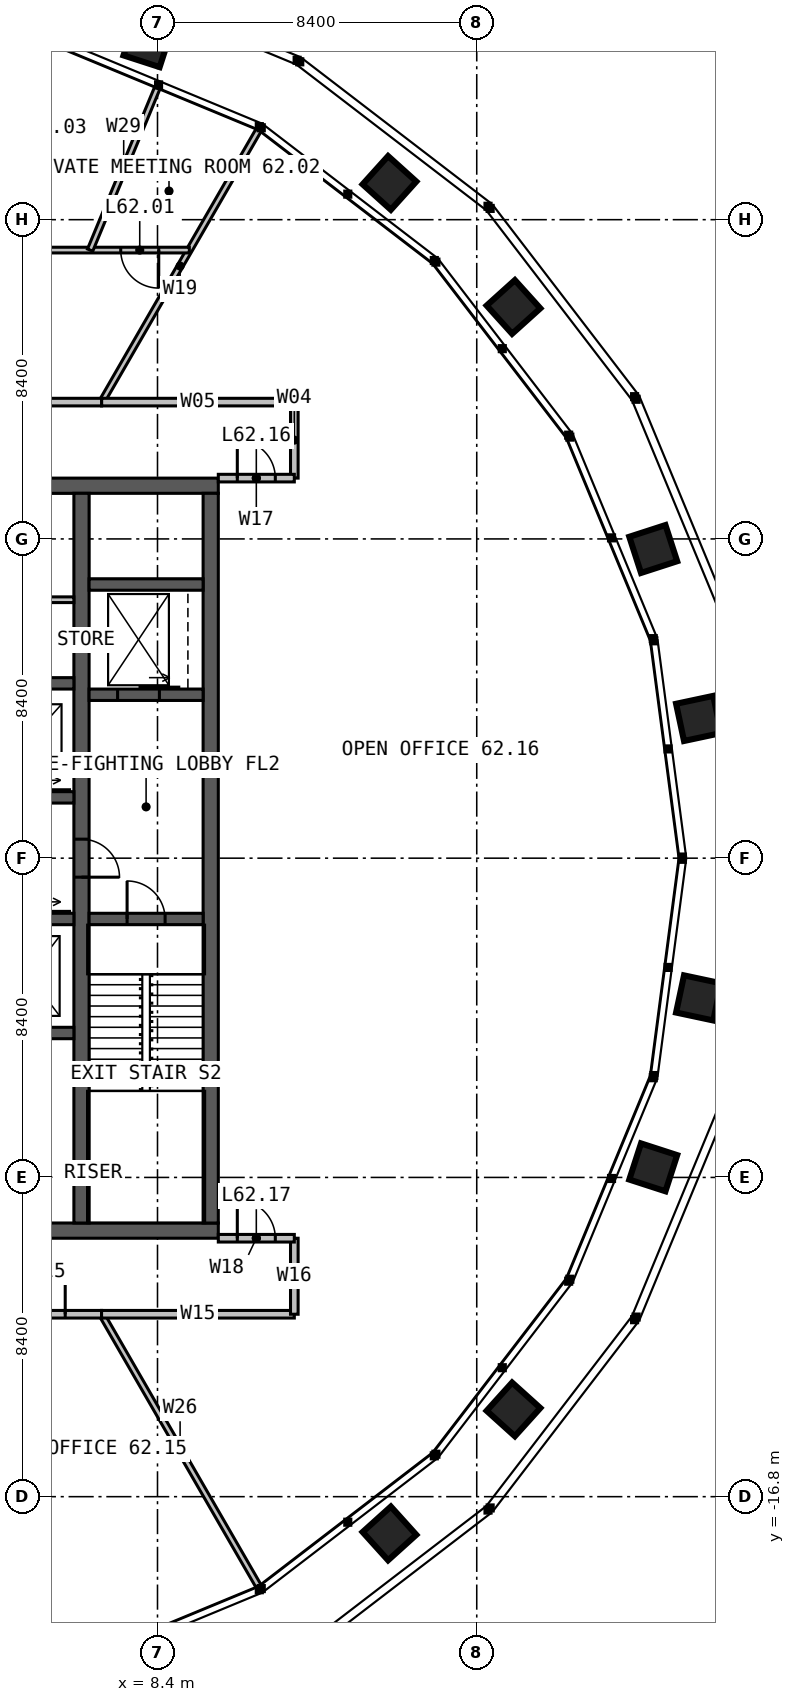
"""IFC4 building model, lengths in metres.
Left out: names, types, materials, properties, quantities, classifications, styles, units other than length and angle.
Written with IfcOpenShell. Run it as: python <this file> out.ifc"""

import sys

from ifc_helpers import new_model, si_unit, direction, frame, frame_2d, origin, place, context, subcontext, project, spatial, rectangle, extrude, element, fill, save


model = new_model("IFC4")
c1 = context("Model", 3, precision=1e-05, world=origin(), true_north=direction((0.0, 1.0)))
c2 = subcontext(c1, "Body", "Model", "MODEL_VIEW")
j1 = project(units=[si_unit("LENGTHUNIT", "METRE"), si_unit("PLANEANGLEUNIT", "RADIAN")], contexts=[c1])
p1 = place(None, origin())
s1 = spatial("IfcSite", under=j1, at=p1, CompositionType="ELEMENT")
p2 = place(p1, origin())
s2 = spatial("IfcBuilding", under=s1, at=p2, CompositionType="ELEMENT")
p3 = place(p2, frame((0.0, 0.0, 256.0)))
s3 = spatial("IfcBuildingStorey", under=s2, at=p3, CompositionType="ELEMENT", Elevation=256.0)
p4 = place(p3, frame((-10.0, 9.8, 0.0), z_axis=(0.0, 0.0, 1.0), x_axis=(1.0, 0.0, 0.0)))
e1 = element("IfcWall", 1, at=p4, inside=s3, PredefinedType="SOLIDWALL", context=c2, shape_type="SweptSolid", body=[
    extrude(rectangle(XDim=20.0, YDim=0.4, at=frame_2d((10.0, 0.0))), origin(), (0.0, 0.0, 1.0), 4.0),
])
p5 = place(p4, frame((9.4, 0.0, 0.0)))
e2 = element("IfcOpeningElement", 2, at=p5, cuts=e1, PredefinedType="OPENING", context=c2, shape_type="SweptSolid", body=[
    extrude(rectangle(XDim=1.2, YDim=2.2, at=frame_2d((0.6, 1.1))), frame((0.0, 0.21, 0.0), z_axis=(0.0, -1.0, 0.0), x_axis=(1.0, 0.0, 0.0)), (0.0, 0.0, 1.0), 0.42),
])
p6 = place(p3, frame((10.0, -9.8, 0.0), z_axis=(0.0, 0.0, 1.0), x_axis=(-1.0, 0.0, 0.0)))
e3 = element("IfcWall", 3, at=p6, inside=s3, PredefinedType="SOLIDWALL", context=c2, shape_type="SweptSolid", body=[
    extrude(rectangle(XDim=20.0, YDim=0.4, at=frame_2d((10.0, 0.0))), origin(), (0.0, 0.0, 1.0), 4.0),
])
p7 = place(p6, frame((6.875, 0.0, 0.0)))
e4 = element("IfcOpeningElement", 4, at=p7, cuts=e3, PredefinedType="OPENING", context=c2, shape_type="SweptSolid", body=[
    extrude(rectangle(XDim=1.2, YDim=2.2, at=frame_2d((0.6, 1.1))), frame((0.0, 0.21, 0.0), z_axis=(0.0, -1.0, 0.0), x_axis=(1.0, 0.0, 0.0)), (0.0, 0.0, 1.0), 0.42),
])
p8 = place(p3, frame((9.8, -9.6, 0.0), z_axis=(0.0, 0.0, 1.0), x_axis=(0.0, 1.0, 0.0)))
e5 = element("IfcWall", 5, at=p8, inside=s3, PredefinedType="SOLIDWALL", context=c2, shape_type="SweptSolid", body=[
    extrude(rectangle(XDim=19.2, YDim=0.4, at=frame_2d((9.6, 0.0))), origin(), (0.0, 0.0, 1.0), 4.0),
])
p9 = place(p3, frame((6.4, 9.6, 0.0), z_axis=(0.0, 0.0, 1.0), x_axis=(0.0, -1.0, 0.0)))
e6 = element("IfcWall", 6, at=p9, inside=s3, PredefinedType="SOLIDWALL", context=c2, shape_type="SweptSolid", body=[
    extrude(rectangle(XDim=19.2, YDim=0.4, at=frame_2d((9.6, 0.0))), origin(), (0.0, 0.0, 1.0), 4.0),
])
p10 = place(p9, frame((9.1, 0.0, 0.0)))
e7 = element("IfcOpeningElement", 7, at=p10, cuts=e6, PredefinedType="OPENING", context=c2, shape_type="SweptSolid", body=[
    extrude(rectangle(XDim=1.0, YDim=2.2, at=frame_2d((0.5, 1.1))), frame((0.0, 0.21, 0.0), z_axis=(0.0, -1.0, 0.0), x_axis=(1.0, 0.0, 0.0)), (0.0, 0.0, 1.0), 0.42),
])
p11 = place(p3, frame((1.35, 1.6, 0.0), z_axis=(0.0, 0.0, 1.0), x_axis=(1.0, 0.0, 0.0)))
e8 = element("IfcWall", 8, at=p11, inside=s3, PredefinedType="SOLIDWALL", context=c2, shape_type="SweptSolid", body=[
    extrude(rectangle(XDim=4.85, YDim=0.3, at=frame_2d((2.425, 0.0))), origin(), (0.0, 0.0, 1.0), 4.0),
])
p12 = place(p11, frame((0.6, 0.0, 0.0)))
e9 = element("IfcOpeningElement", 9, at=p12, cuts=e8, PredefinedType="OPENING", context=c2, shape_type="SweptSolid", body=[
    extrude(rectangle(XDim=1.1, YDim=2.2, at=frame_2d((0.55, 1.1))), frame((0.0, 0.16, 0.0), z_axis=(0.0, -1.0, 0.0), x_axis=(1.0, 0.0, 0.0)), (0.0, 0.0, 1.0), 0.32),
])
p13 = place(p11, frame((3.125, 0.0, 0.0)))
e10 = element("IfcOpeningElement", 10, at=p13, cuts=e8, PredefinedType="OPENING", context=c2, shape_type="SweptSolid", body=[
    extrude(rectangle(XDim=1.1, YDim=2.2, at=frame_2d((0.55, 1.1))), frame((0.0, 0.16, 0.0), z_axis=(0.0, -1.0, 0.0), x_axis=(1.0, 0.0, 0.0)), (0.0, 0.0, 1.0), 0.32),
])
p14 = place(p3, frame((1.35, 4.6, 0.0), z_axis=(0.0, 0.0, 1.0), x_axis=(1.0, 0.0, 0.0)))
e11 = element("IfcWall", 11, at=p14, inside=s3, PredefinedType="SOLIDWALL", context=c2, shape_type="SweptSolid", body=[
    extrude(rectangle(XDim=4.85, YDim=0.3, at=frame_2d((2.425, 0.0))), origin(), (0.0, 0.0, 1.0), 4.0),
])
p15 = place(p3, frame((3.85, -1.6, 0.0), z_axis=(0.0, 0.0, 1.0), x_axis=(1.0, 0.0, 0.0)))
e12 = element("IfcWall", 12, at=p15, inside=s3, PredefinedType="SOLIDWALL", context=c2, shape_type="SweptSolid", body=[
    extrude(rectangle(XDim=2.35, YDim=0.3, at=frame_2d((1.175, 0.0))), origin(), (0.0, 0.0, 1.0), 4.0),
])
p16 = place(p15, frame((0.625, 0.0, 0.0)))
e13 = element("IfcOpeningElement", 13, at=p16, cuts=e12, PredefinedType="OPENING", context=c2, shape_type="SweptSolid", body=[
    extrude(rectangle(XDim=1.1, YDim=2.2, at=frame_2d((0.55, 1.1))), frame((0.0, 0.16, 0.0), z_axis=(0.0, -1.0, 0.0), x_axis=(1.0, 0.0, 0.0)), (0.0, 0.0, 1.0), 0.32),
])
p17 = place(p3, frame((3.85, -4.6, 0.0), z_axis=(0.0, 0.0, 1.0), x_axis=(1.0, 0.0, 0.0)))
e14 = element("IfcWall", 14, at=p17, inside=s3, PredefinedType="SOLIDWALL", context=c2, shape_type="SweptSolid", body=[
    extrude(rectangle(XDim=2.35, YDim=0.3, at=frame_2d((1.175, 0.0))), origin(), (0.0, 0.0, 1.0), 4.0),
])
p18 = place(p3, frame((6.6, -1.6, 0.0), z_axis=(0.0, 0.0, 1.0), x_axis=(1.0, 0.0, 0.0)))
e15 = element("IfcWall", 15, at=p18, inside=s3, PredefinedType="SOLIDWALL", context=c2, shape_type="SweptSolid", body=[
    extrude(rectangle(XDim=3.0, YDim=0.3, at=frame_2d((1.5, 0.0))), origin(), (0.0, 0.0, 1.0), 4.0),
])
p19 = place(p18, frame((1.0, 0.0, 0.0)))
e16 = element("IfcOpeningElement", 16, at=p19, cuts=e15, PredefinedType="OPENING", context=c2, shape_type="SweptSolid", body=[
    extrude(rectangle(XDim=1.0, YDim=2.2, at=frame_2d((0.5, 1.1))), frame((0.0, 0.16, 0.0), z_axis=(0.0, -1.0, 0.0), x_axis=(1.0, 0.0, 0.0)), (0.0, 0.0, 1.0), 0.32),
])
p20 = place(p3, frame((6.6, 4.3, 0.0), z_axis=(0.0, 0.0, 1.0), x_axis=(1.0, 0.0, 0.0)))
e17 = element("IfcWall", 17, at=p20, inside=s3, PredefinedType="SOLIDWALL", context=c2, shape_type="SweptSolid", body=[
    extrude(rectangle(XDim=3.0, YDim=0.3, at=frame_2d((1.5, 0.0))), origin(), (0.0, 0.0, 1.0), 4.0),
])
p21 = place(p20, frame((0.75, 0.0, 0.0)))
e18 = element("IfcOpeningElement", 18, at=p21, cuts=e17, PredefinedType="OPENING", context=c2, shape_type="SweptSolid", body=[
    extrude(rectangle(XDim=1.1, YDim=2.2, at=frame_2d((0.55, 1.1))), frame((0.0, 0.16, 0.0), z_axis=(0.0, -1.0, 0.0), x_axis=(1.0, 0.0, 0.0)), (0.0, 0.0, 1.0), 0.32),
])
p22 = place(p3, frame((6.6, 7.2, 0.0), z_axis=(0.0, 0.0, 1.0), x_axis=(1.0, 0.0, 0.0)))
e19 = element("IfcWall", 19, at=p22, inside=s3, PredefinedType="SOLIDWALL", context=c2, shape_type="SweptSolid", body=[
    extrude(rectangle(XDim=3.0, YDim=0.3, at=frame_2d((1.5, 0.0))), origin(), (0.0, 0.0, 1.0), 4.0),
])
p23 = place(p3, frame((1.35, 6.8, 0.0), z_axis=(0.0, 0.0, 1.0), x_axis=(1.0, 0.0, 0.0)))
e20 = element("IfcWall", 20, at=p23, inside=s3, PredefinedType="PARTITIONING", context=c2, shape_type="SweptSolid", body=[
    extrude(rectangle(XDim=4.85, YDim=0.15, at=frame_2d((2.425, 0.0))), origin(), (0.0, 0.0, 1.0), 3.75),
])
p24 = place(p23, frame((3.15, 0.0, 0.0)))
e21 = element("IfcOpeningElement", 21, at=p24, cuts=e20, PredefinedType="OPENING", context=c2, shape_type="SweptSolid", body=[
    extrude(rectangle(XDim=0.9, YDim=2.2, at=frame_2d((0.45, 1.1))), frame((0.0, 0.085, 0.0), z_axis=(0.0, -1.0, 0.0), x_axis=(1.0, 0.0, 0.0)), (0.0, 0.0, 1.0), 0.17),
])
p25 = place(p3, frame((6.928, 12.0, 0.0), z_axis=(0.0, 0.0, 1.0), x_axis=(0.499989206474, 0.86603163534, 0.0)))
e22 = element("IfcWall", 22, at=p25, inside=s3, PredefinedType="PARTITIONING", context=c2, shape_type="SweptSolid", body=[
    extrude(rectangle(XDim=8.266, YDim=0.15, at=frame_2d((4.133, 0.0))), origin(), (0.0, 0.0, 1.0), 2.79),
])
p26 = place(p3, frame((3.215, -12.0, 0.0), z_axis=(0.0, 0.0, 1.0), x_axis=(0.258818707819, -0.965925916664, 0.0)))
e23 = element("IfcWall", 23, at=p26, inside=s3, PredefinedType="PARTITIONING", context=c2, shape_type="SweptSolid", body=[
    extrude(rectangle(XDim=9.699, YDim=0.15, at=frame_2d((4.85, 0.0))), origin(), (0.0, 0.0, 1.0), 2.79),
])
p27 = place(p3, frame((6.928, -12.0, 0.0), z_axis=(0.0, 0.0, 1.0), x_axis=(0.499989206474, -0.86603163534, 0.0)))
e24 = element("IfcWall", 24, at=p27, inside=s3, PredefinedType="PARTITIONING", context=c2, shape_type="SweptSolid", body=[
    extrude(rectangle(XDim=8.266, YDim=0.15, at=frame_2d((4.133, 0.0))), origin(), (0.0, 0.0, 1.0), 2.79),
])
p28 = place(p3, frame((12.0, 10.0, 0.0), z_axis=(0.0, 0.0, 1.0), x_axis=(0.0, 1.0, 0.0)))
e25 = element("IfcWall", 25, at=p28, inside=s3, PredefinedType="PARTITIONING", context=c2, shape_type="SweptSolid", body=[
    extrude(rectangle(XDim=2.0, YDim=0.2, at=frame_2d((1.0, 0.0))), origin(), (0.0, 0.0, 1.0), 3.8),
])
p29 = place(p3, frame((12.0, 12.0, 0.0), z_axis=(0.0, 0.0, 1.0), x_axis=(-1.0, 0.0, 0.0)))
e26 = element("IfcWall", 26, at=p29, inside=s3, PredefinedType="PARTITIONING", context=c2, shape_type="SweptSolid", body=[
    extrude(rectangle(XDim=5.072, YDim=0.2, at=frame_2d((2.536, 0.0))), origin(), (0.0, 0.0, 1.0), 3.8),
])
p30 = place(p3, frame((9.238, 16.0, 0.0), z_axis=(0.0, 0.0, 1.0), x_axis=(-1.0, 0.0, 0.0)))
e27 = element("IfcWall", 27, at=p30, inside=s3, PredefinedType="PARTITIONING", context=c2, shape_type="SweptSolid", body=[
    extrude(rectangle(XDim=18.475, YDim=0.15, at=frame_2d((9.238, 0.0))), origin(), (0.0, 0.0, 1.0), 2.79),
])
p31 = place(p30, frame((0.805, 0.0, 0.0)))
e28 = element("IfcOpeningElement", 28, at=p31, cuts=e27, PredefinedType="OPENING", context=c2, shape_type="SweptSolid", body=[
    extrude(rectangle(XDim=1.0, YDim=2.2, at=frame_2d((0.5, 1.1))), frame((0.0, 0.085, 0.0), z_axis=(0.0, -1.0, 0.0), x_axis=(1.0, 0.0, 0.0)), (0.0, 0.0, 1.0), 0.17),
])
p32 = place(p30, frame((6.077, 0.0, 0.0)))
e29 = element("IfcOpeningElement", 29, at=p32, cuts=e27, PredefinedType="OPENING", context=c2, shape_type="SweptSolid", body=[
    extrude(rectangle(XDim=1.8, YDim=2.2, at=frame_2d((0.9, 1.1))), frame((0.0, 0.085, 0.0), z_axis=(0.0, -1.0, 0.0), x_axis=(1.0, 0.0, 0.0)), (0.0, 0.0, 1.0), 0.17),
])
p33 = place(p30, frame((11.934, 0.0, 0.0)))
e30 = element("IfcOpeningElement", 30, at=p33, cuts=e27, PredefinedType="OPENING", context=c2, shape_type="SweptSolid", body=[
    extrude(rectangle(XDim=1.0, YDim=2.2, at=frame_2d((0.5, 1.1))), frame((0.0, 0.085, 0.0), z_axis=(0.0, -1.0, 0.0), x_axis=(1.0, 0.0, 0.0)), (0.0, 0.0, 1.0), 0.17),
])
p34 = place(p30, frame((14.195, 0.0, 0.0)))
e31 = element("IfcOpeningElement", 31, at=p34, cuts=e27, PredefinedType="OPENING", context=c2, shape_type="SweptSolid", body=[
    extrude(rectangle(XDim=1.0, YDim=2.2, at=frame_2d((0.5, 1.1))), frame((0.0, 0.085, 0.0), z_axis=(0.0, -1.0, 0.0), x_axis=(1.0, 0.0, 0.0)), (0.0, 0.0, 1.0), 0.17),
])
p35 = place(p30, frame((16.67, 0.0, 0.0)))
e32 = element("IfcOpeningElement", 32, at=p35, cuts=e27, PredefinedType="OPENING", context=c2, shape_type="SweptSolid", body=[
    extrude(rectangle(XDim=1.0, YDim=2.2, at=frame_2d((0.5, 1.1))), frame((0.0, 0.085, 0.0), z_axis=(0.0, -1.0, 0.0), x_axis=(1.0, 0.0, 0.0)), (0.0, 0.0, 1.0), 0.17),
])
p36 = place(p3, frame((6.627, 16.0, 0.0), z_axis=(0.0, 0.0, 1.0), x_axis=(0.38266485266, 0.923887228258, 0.0)))
e33 = element("IfcWall", 33, at=p36, inside=s3, PredefinedType="PARTITIONING", context=c2, shape_type="SweptSolid", body=[
    extrude(rectangle(XDim=4.615, YDim=0.15, at=frame_2d((2.307, 0.0))), origin(), (0.0, 0.0, 1.0), 2.79),
])
p37 = place(p3, frame((6.928, 12.0, 0.0), z_axis=(0.0, 0.0, 1.0), x_axis=(-1.0, 0.0, 0.0)))
e34 = element("IfcWall", 34, at=p37, inside=s3, PredefinedType="PARTITIONING", context=c2, shape_type="SweptSolid", body=[
    extrude(rectangle(XDim=13.856, YDim=0.2, at=frame_2d((6.928, 0.0))), origin(), (0.0, 0.0, 1.0), 3.8),
])
p38 = place(p37, frame((6.028, 0.0, 0.0)))
e35 = element("IfcOpeningElement", 35, at=p38, cuts=e34, PredefinedType="OPENING", context=c2, shape_type="SweptSolid", body=[
    extrude(rectangle(XDim=1.8, YDim=2.2, at=frame_2d((0.9, 1.1))), frame((0.0, 0.11, 0.0), z_axis=(0.0, -1.0, 0.0), x_axis=(1.0, 0.0, 0.0)), (0.0, 0.0, 1.0), 0.22),
])
p39 = place(p3, frame((3.215, -12.0, 0.0), z_axis=(0.0, 0.0, 1.0), x_axis=(1.0, 0.0, 0.0)))
e36 = element("IfcWall", 36, at=p39, inside=s3, PredefinedType="PARTITIONING", context=c2, shape_type="SweptSolid", body=[
    extrude(rectangle(XDim=3.713, YDim=0.2, at=frame_2d((1.856, 0.0))), origin(), (0.0, 0.0, 1.0), 3.8),
])
p40 = place(p39, frame((0.956, 0.0, 0.0)))
e37 = element("IfcOpeningElement", 37, at=p40, cuts=e36, PredefinedType="OPENING", context=c2, shape_type="SweptSolid", body=[
    extrude(rectangle(XDim=1.8, YDim=2.2, at=frame_2d((0.9, 1.1))), frame((0.0, 0.11, 0.0), z_axis=(0.0, -1.0, 0.0), x_axis=(1.0, 0.0, 0.0)), (0.0, 0.0, 1.0), 0.22),
])
p41 = place(p3, frame((6.928, -12.0, 0.0), z_axis=(0.0, 0.0, 1.0), x_axis=(1.0, 0.0, 0.0)))
e38 = element("IfcWall", 38, at=p41, inside=s3, PredefinedType="PARTITIONING", context=c2, shape_type="SweptSolid", body=[
    extrude(rectangle(XDim=5.072, YDim=0.2, at=frame_2d((2.536, 0.0))), origin(), (0.0, 0.0, 1.0), 3.8),
])
p42 = place(p3, frame((12.0, -12.0, 0.0), z_axis=(0.0, 0.0, 1.0), x_axis=(0.0, 1.0, 0.0)))
e39 = element("IfcWall", 39, at=p42, inside=s3, PredefinedType="PARTITIONING", context=c2, shape_type="SweptSolid", body=[
    extrude(rectangle(XDim=2.0, YDim=0.2, at=frame_2d((1.0, 0.0))), origin(), (0.0, 0.0, 1.0), 3.8),
])
p43 = place(p3, frame((10.0, 10.0, 0.0), z_axis=(0.0, 0.0, 1.0), x_axis=(1.0, 0.0, 0.0)))
e40 = element("IfcWall", 40, at=p43, inside=s3, PredefinedType="PARTITIONING", context=c2, shape_type="SweptSolid", body=[
    extrude(rectangle(XDim=2.0, YDim=0.2, at=frame_2d((1.0, 0.0))), origin(), (0.0, 0.0, 1.0), 3.8),
])
p44 = place(p43, frame((0.5, 0.0, 0.0)))
e41 = element("IfcOpeningElement", 41, at=p44, cuts=e40, PredefinedType="OPENING", context=c2, shape_type="SweptSolid", body=[
    extrude(rectangle(XDim=1.0, YDim=2.2, at=frame_2d((0.5, 1.1))), frame((0.0, 0.11, 0.0), z_axis=(0.0, -1.0, 0.0), x_axis=(1.0, 0.0, 0.0)), (0.0, 0.0, 1.0), 0.22),
])
p45 = place(p3, frame((10.0, -10.0, 0.0), z_axis=(0.0, 0.0, 1.0), x_axis=(1.0, 0.0, 0.0)))
e42 = element("IfcWall", 42, at=p45, inside=s3, PredefinedType="PARTITIONING", context=c2, shape_type="SweptSolid", body=[
    extrude(rectangle(XDim=2.0, YDim=0.2, at=frame_2d((1.0, 0.0))), origin(), (0.0, 0.0, 1.0), 3.8),
])
p46 = place(p45, frame((0.5, 0.0, 0.0)))
e43 = element("IfcOpeningElement", 43, at=p46, cuts=e42, PredefinedType="OPENING", context=c2, shape_type="SweptSolid", body=[
    extrude(rectangle(XDim=1.0, YDim=2.2, at=frame_2d((0.5, 1.1))), frame((0.0, 0.11, 0.0), z_axis=(0.0, -1.0, 0.0), x_axis=(1.0, 0.0, 0.0)), (0.0, 0.0, 1.0), 0.22),
])
p47 = place(p10, origin())
e44 = element("IfcDoor", 44, at=p47, inside=s3, OperationType="SINGLE_SWING_RIGHT", PredefinedType="DOOR", context=c2, shape_type="SweptSolid", body=[
    extrude(rectangle(XDim=1.0, YDim=2.2, at=frame_2d((0.5, 1.1))), frame((0.0, 0.025, 0.0), z_axis=(0.0, -1.0, 0.0), x_axis=(1.0, 0.0, 0.0)), (0.0, 0.0, 1.0), 0.05),
])
fill(e7, e44)
p48 = place(p19, origin())
e45 = element("IfcDoor", 45, at=p48, inside=s3, OperationType="SINGLE_SWING_LEFT", PredefinedType="DOOR", context=c2, shape_type="SweptSolid", body=[
    extrude(rectangle(XDim=1.0, YDim=2.2, at=frame_2d((0.5, 1.1))), frame((0.0, 0.025, 0.0), z_axis=(0.0, -1.0, 0.0), x_axis=(1.0, 0.0, 0.0)), (0.0, 0.0, 1.0), 0.05),
])
fill(e16, e45)
p49 = place(p21, origin())
e46 = element("IfcDoor", 46, at=p49, inside=s3, OperationType="SLIDING_TO_LEFT", PredefinedType="DOOR", context=c2, shape_type="SweptSolid", body=[
    extrude(rectangle(XDim=1.1, YDim=2.2, at=frame_2d((0.55, 1.1))), frame((0.0, 0.025, 0.0), z_axis=(0.0, -1.0, 0.0), x_axis=(1.0, 0.0, 0.0)), (0.0, 0.0, 1.0), 0.05),
])
fill(e18, e46)
p50 = place(p31, origin())
e47 = element("IfcDoor", 47, at=p50, inside=s3, OperationType="SINGLE_SWING_LEFT", PredefinedType="DOOR", context=c2, shape_type="SweptSolid", body=[
    extrude(rectangle(XDim=1.0, YDim=2.2, at=frame_2d((0.5, 1.1))), frame((0.0, 0.025, 0.0), z_axis=(0.0, -1.0, 0.0), x_axis=(1.0, 0.0, 0.0)), (0.0, 0.0, 1.0), 0.05),
])
fill(e28, e47)
p51 = place(p40, origin())
e48 = element("IfcDoor", 48, at=p51, inside=s3, OperationType="DOUBLE_DOOR_SINGLE_SWING", PredefinedType="DOOR", context=c2, shape_type="SweptSolid", body=[
    extrude(rectangle(XDim=1.8, YDim=2.2, at=frame_2d((0.9, 1.1))), frame((0.0, 0.025, 0.0), z_axis=(0.0, -1.0, 0.0), x_axis=(1.0, 0.0, 0.0)), (0.0, 0.0, 1.0), 0.05),
])
fill(e37, e48)
p52 = place(p44, origin())
e49 = element("IfcDoor", 49, at=p52, inside=s3, OperationType="SINGLE_SWING_LEFT", PredefinedType="DOOR", context=c2, shape_type="SweptSolid", body=[
    extrude(rectangle(XDim=1.0, YDim=2.2, at=frame_2d((0.5, 1.1))), frame((0.0, 0.025, 0.0), z_axis=(0.0, -1.0, 0.0), x_axis=(1.0, 0.0, 0.0)), (0.0, 0.0, 1.0), 0.05),
])
fill(e41, e49)
p53 = place(p46, origin())
e50 = element("IfcDoor", 50, at=p53, inside=s3, OperationType="SINGLE_SWING_LEFT", PredefinedType="DOOR", context=c2, shape_type="SweptSolid", body=[
    extrude(rectangle(XDim=1.0, YDim=2.2, at=frame_2d((0.5, 1.1))), frame((0.0, 0.025, 0.0), z_axis=(0.0, -1.0, 0.0), x_axis=(1.0, 0.0, 0.0)), (0.0, 0.0, 1.0), 0.05),
])
fill(e43, e50)
save(model, sys.argv[1])
